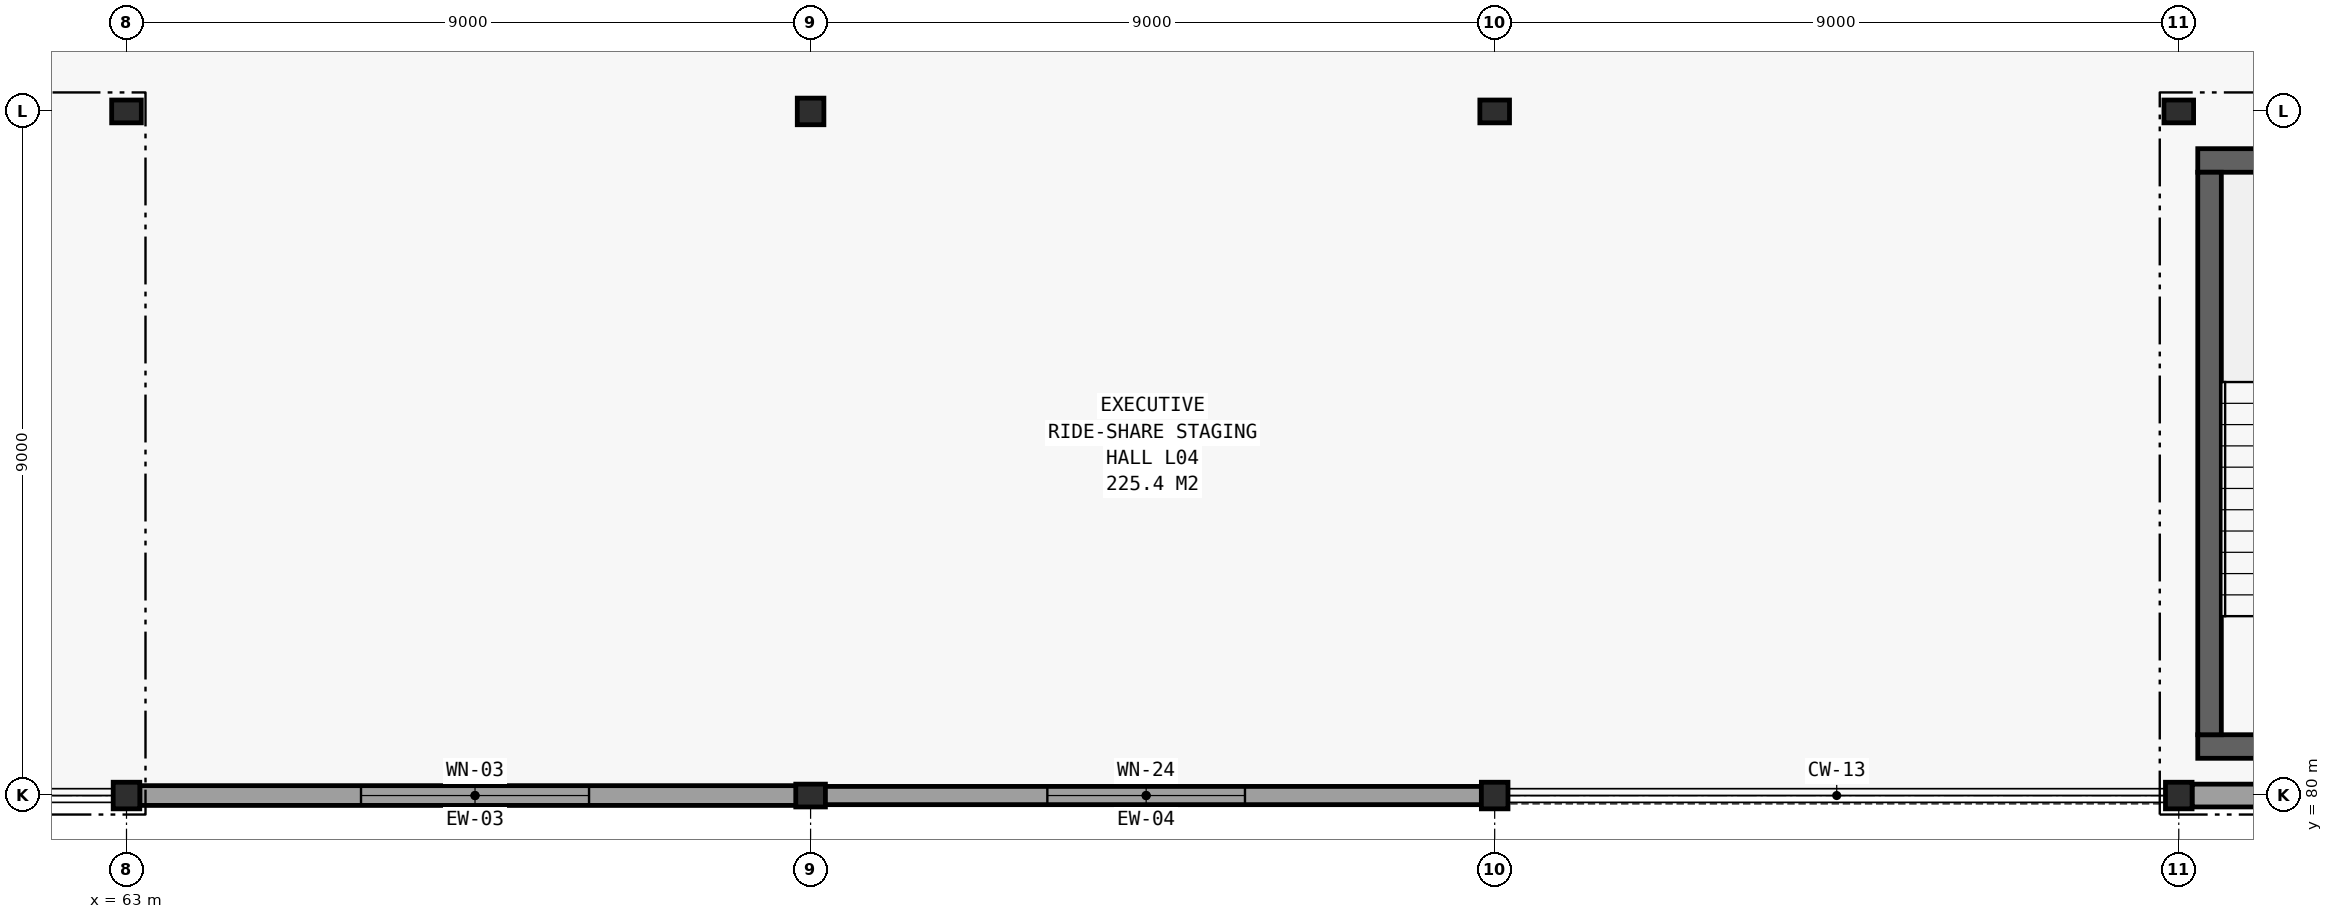
"""IFC4 building model, lengths in metres.
Left out: names, types, materials, properties, quantities, classifications, styles, units other than length and angle.
Written with IfcOpenShell. Run it as: python <this file> out.ifc"""

import sys

from ifc_helpers import new_model, si_unit, direction, frame, frame_2d, origin, origin_2d, place, context, subcontext, project, spatial, rectangle, hollow_rectangle, i_section, extrude, element, fill, save


model = new_model("IFC4")
c1 = context("Model", 3, precision=1e-05, world=origin(), true_north=direction((0.0, 1.0)))
c2 = subcontext(c1, "Body", "Model", "MODEL_VIEW")
j1 = project(units=[si_unit("LENGTHUNIT", "METRE"), si_unit("PLANEANGLEUNIT", "RADIAN")], contexts=[c1])
p1 = place(None, origin())
s1 = spatial("IfcSite", under=j1, at=p1, CompositionType="ELEMENT")
p2 = place(p1, origin())
s2 = spatial("IfcBuilding", under=s1, at=p2, CompositionType="ELEMENT")
p3 = place(p2, frame((0.0, 0.0, 17.7)))
s3 = spatial("IfcBuildingStorey", under=s2, at=p3, CompositionType="ELEMENT", Elevation=17.7)
p4 = place(p3, frame((63.0, 80.0, 0.0), z_axis=(0.0, 0.0, 1.0), x_axis=(1.0, 0.0, 0.0)))
e1 = element("IfcColumn", 1, at=p4, inside=s3, PredefinedType="COLUMN", context=c2, shape_type="SweptSolid", body=[
    extrude(hollow_rectangle(XDim=0.35, YDim=0.35, WallThickness=0.016, at=origin_2d()), origin(), (0.0, 0.0, 1.0), 4.2),
])
for number, where, z_axis, x_axis in (
    (2, (63.0, 89.0, 0.0), (0.0, 0.0, 1.0), (1.0, 0.0, 0.0)),
    (3, (72.0, 80.0, 0.0), (0.0, 0.0, 1.0), (1.0, 0.0, 0.0)),
):
    element("IfcColumn", number, at=place(p3, frame(where, z_axis=z_axis, x_axis=x_axis)), inside=s3, PredefinedType="COLUMN", context=c2, shape_type="SweptSolid", body=[
        extrude(i_section(OverallWidth=0.3, OverallDepth=0.39, WebThickness=0.01, FlangeThickness=0.016, FilletRadius=0.013, at=origin_2d()), origin(), (0.0, 0.0, 1.0), 4.2),
    ])
for number, where, z_axis, x_axis in (
    (4, (72.0, 89.0, 0.0), (0.0, 0.0, 1.0), (1.0, 0.0, 0.0)),
    (5, (81.0, 80.0, 0.0), (0.0, 0.0, 1.0), (1.0, 0.0, 0.0)),
):
    element("IfcColumn", number, at=place(p3, frame(where, z_axis=z_axis, x_axis=x_axis)), inside=s3, PredefinedType="COLUMN", context=c2, shape_type="SweptSolid", body=[
        extrude(hollow_rectangle(XDim=0.35, YDim=0.35, WallThickness=0.016, at=origin_2d()), origin(), (0.0, 0.0, 1.0), 4.2),
    ])
p5 = place(p3, frame((81.0, 89.0, 0.0), z_axis=(0.0, 0.0, 1.0), x_axis=(1.0, 0.0, 0.0)))
e6 = element("IfcColumn", 6, at=p5, inside=s3, PredefinedType="COLUMN", context=c2, shape_type="SweptSolid", body=[
    extrude(i_section(OverallWidth=0.3, OverallDepth=0.39, WebThickness=0.01, FlangeThickness=0.016, FilletRadius=0.013, at=origin_2d()), origin(), (0.0, 0.0, 1.0), 4.2),
])
p6 = place(p3, frame((90.0, 80.0, 0.0), z_axis=(0.0, 0.0, 1.0), x_axis=(1.0, 0.0, 0.0)))
e7 = element("IfcColumn", 7, at=p6, inside=s3, PredefinedType="COLUMN", context=c2, shape_type="SweptSolid", body=[
    extrude(hollow_rectangle(XDim=0.35, YDim=0.35, WallThickness=0.016, at=origin_2d()), origin(), (0.0, 0.0, 1.0), 4.2),
])
p7 = place(p3, frame((90.0, 89.0, 0.0), z_axis=(0.0, 0.0, 1.0), x_axis=(1.0, 0.0, 0.0)))
e8 = element("IfcColumn", 8, at=p7, inside=s3, PredefinedType="COLUMN", context=c2, shape_type="SweptSolid", body=[
    extrude(i_section(OverallWidth=0.3, OverallDepth=0.39, WebThickness=0.01, FlangeThickness=0.016, FilletRadius=0.013, at=origin_2d()), origin(), (0.0, 0.0, 1.0), 4.2),
])
p8 = place(p3, frame((63.175, 80.0, 0.0), z_axis=(0.0, 0.0, 1.0), x_axis=(1.0, 0.0, 0.0)))
e9 = element("IfcWall", 9, at=p8, inside=s3, PredefinedType="SOLIDWALL", context=c2, shape_type="SweptSolid", body=[
    extrude(rectangle(XDim=8.821, YDim=0.26, at=frame_2d((4.41, 0.0))), origin(), (0.0, 0.0, 1.0), 3.25),
])
p9 = place(p8, frame((2.91, 0.0, 0.95)))
e10 = element("IfcOpeningElement", 10, at=p9, cuts=e9, PredefinedType="OPENING", context=c2, shape_type="SweptSolid", body=[
    extrude(rectangle(XDim=3.0, YDim=2.0, at=frame_2d((1.5, 1.0))), frame((0.0, 0.141, 0.0), z_axis=(0.0, -1.0, 0.0), x_axis=(1.0, 0.0, 0.0)), (0.0, 0.0, 1.0), 0.282),
])
p10 = place(p3, frame((72.004, 80.0, 0.0), z_axis=(0.0, 0.0, 1.0), x_axis=(1.0, 0.0, 0.0)))
e11 = element("IfcWall", 11, at=p10, inside=s3, PredefinedType="SOLIDWALL", context=c2, shape_type="SweptSolid", body=[
    extrude(rectangle(XDim=8.821, YDim=0.24, at=frame_2d((4.41, 0.0))), origin(), (0.0, 0.0, 1.0), 3.25),
])
p11 = place(p10, frame((3.11, 0.0, 0.95)))
e12 = element("IfcOpeningElement", 12, at=p11, cuts=e11, PredefinedType="OPENING", context=c2, shape_type="SweptSolid", body=[
    extrude(rectangle(XDim=2.6, YDim=1.9, at=frame_2d((1.3, 0.95))), frame((0.0, 0.131, 0.0), z_axis=(0.0, -1.0, 0.0), x_axis=(1.0, 0.0, 0.0)), (0.0, 0.0, 1.0), 0.262),
])
p12 = place(p3, frame((90.175, 80.0, 0.0), z_axis=(0.0, 0.0, 1.0), x_axis=(1.0, 0.0, 0.0)))
e13 = element("IfcWall", 13, at=p12, inside=s3, PredefinedType="SOLIDWALL", context=c2, shape_type="SweptSolid", body=[
    extrude(rectangle(XDim=8.65, YDim=0.3, at=frame_2d((4.325, 0.0))), origin(), (0.0, 0.0, 1.0), 3.25),
])
p13 = place(p12, frame((3.225, 0.0, 0.95)))
e14 = element("IfcOpeningElement", 14, at=p13, cuts=e13, PredefinedType="OPENING", context=c2, shape_type="SweptSolid", body=[
    extrude(rectangle(XDim=2.2, YDim=1.8, at=frame_2d((1.1, 0.9))), frame((0.0, 0.161, 0.0), z_axis=(0.0, -1.0, 0.0), x_axis=(1.0, 0.0, 0.0)), (0.0, 0.0, 1.0), 0.322),
])
for number, where, z_axis, x_axis in (
    (15, (90.25, 80.645, 0.0), (0.0, 0.0, 1.0), (1.0, 0.0, 0.0)),
    (16, (90.25, 88.355, 0.0), (0.0, 0.0, 1.0), (1.0, 0.0, 0.0)),
):
    element("IfcWall", number, at=place(p3, frame(where, z_axis=z_axis, x_axis=x_axis)), inside=s3, PredefinedType="SHEAR", context=c2, shape_type="SweptSolid", body=[
        extrude(rectangle(XDim=3.9, YDim=0.31, at=frame_2d((1.95, 0.0))), origin(), (0.0, 0.0, 1.0), 3.92),
    ])
p14 = place(p3, frame((90.405, 80.8, 0.0), z_axis=(0.0, 0.0, 1.0), x_axis=(0.0, 1.0, 0.0)))
e17 = element("IfcWall", 17, at=p14, inside=s3, PredefinedType="SHEAR", context=c2, shape_type="SweptSolid", body=[
    extrude(rectangle(XDim=7.4, YDim=0.31, at=frame_2d((3.7, 0.0))), origin(), (0.0, 0.0, 1.0), 3.92),
])
p15 = place(p9, origin())
e18 = element("IfcWindow", 18, at=p15, inside=s3, PartitioningType="SINGLE_PANEL", PredefinedType="WINDOW", context=c2, shape_type="SweptSolid", body=[
    extrude(rectangle(XDim=3.0, YDim=2.0, at=frame_2d((1.5, 1.0))), frame((0.0, 0.03, 0.0), z_axis=(0.0, -1.0, 0.0), x_axis=(1.0, 0.0, 0.0)), (0.0, 0.0, 1.0), 0.06),
])
fill(e10, e18)
p16 = place(p11, origin())
e19 = element("IfcWindow", 19, at=p16, inside=s3, PartitioningType="SINGLE_PANEL", PredefinedType="WINDOW", context=c2, shape_type="SweptSolid", body=[
    extrude(rectangle(XDim=2.6, YDim=1.9, at=frame_2d((1.3, 0.95))), frame((0.0, 0.03, 0.0), z_axis=(0.0, -1.0, 0.0), x_axis=(1.0, 0.0, 0.0)), (0.0, 0.0, 1.0), 0.06),
])
fill(e12, e19)
save(model, sys.argv[1])
